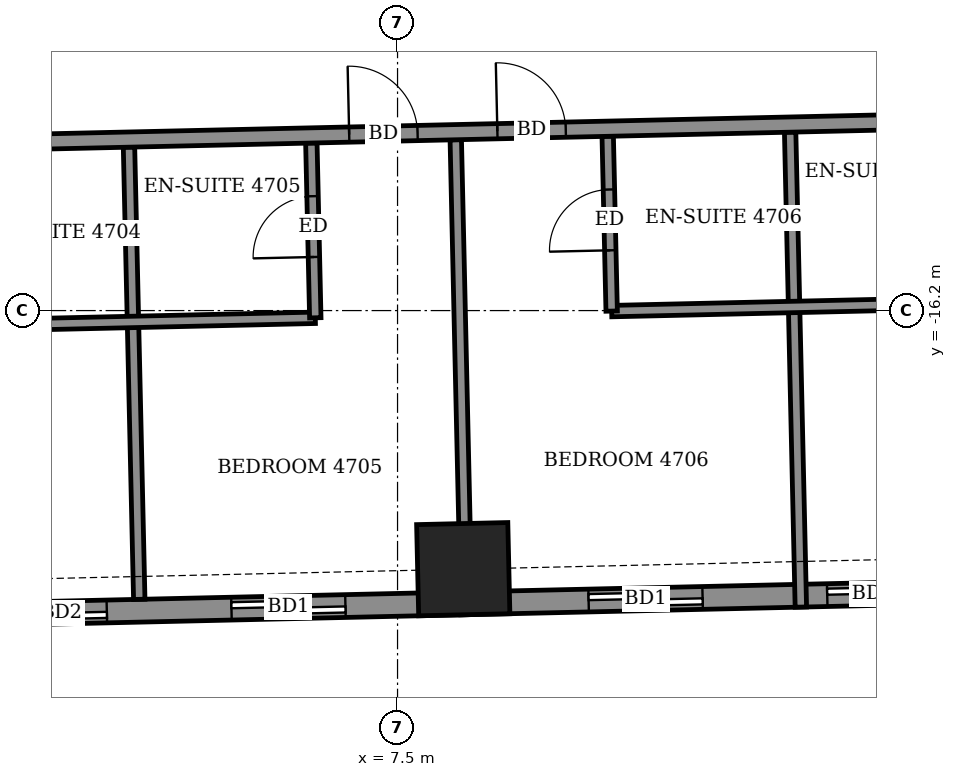
"""IFC4 building model, lengths in metres.
Left out: names, types, materials, properties, quantities, classifications, styles, units other than length and angle.
Written with IfcOpenShell. Run it as: python <this file> out.ifc"""

import sys

from ifc_helpers import new_model, si_unit, direction, frame, frame_2d, origin, origin_2d, place, context, subcontext, project, spatial, rectangle, extrude, element, fill, save


model = new_model("IFC4")
c1 = context("Model", 3, precision=1e-05, world=origin(), true_north=direction((0.0, 1.0)))
c2 = subcontext(c1, "Body", "Model", "MODEL_VIEW")
j1 = project(units=[si_unit("LENGTHUNIT", "METRE"), si_unit("PLANEANGLEUNIT", "RADIAN")], contexts=[c1])
p1 = place(None, origin())
s1 = spatial("IfcSite", under=j1, at=p1, CompositionType="ELEMENT")
p2 = place(p1, origin())
s2 = spatial("IfcBuilding", under=s1, at=p2, CompositionType="ELEMENT")
p3 = place(p2, frame((0.0, 0.0, 186.1)))
s3 = spatial("IfcBuildingStorey", under=s2, at=p3, CompositionType="ELEMENT", Elevation=186.1)
p4 = place(p3, frame((8.365, -19.602, -0.55), z_axis=(0.0, 0.0, 1.0), x_axis=(0.99974280054, 0.022678905801, 0.0)))
e1 = element("IfcColumn", 1, at=p4, inside=s3, PredefinedType="COLUMN", context=c2, shape_type="SweptSolid", body=[
    extrude(rectangle(XDim=1.2, YDim=1.2, at=origin_2d()), origin(), (0.0, 0.0, 1.0), 3.6),
])
p5 = place(p3, frame((-18.189, -20.655, 0.0), z_axis=(0.0, 0.0, 1.0), x_axis=(0.999742285265, 0.022701609063, 0.0)))
e2 = element("IfcWall", 2, at=p5, inside=s3, PredefinedType="SOLIDWALL", context=c2, shape_type="SweptSolid", body=[
    extrude(rectangle(XDim=39.78, YDim=0.3, at=frame_2d((19.89, 0.0))), origin(), (0.0, 0.0, 1.0), 3.05),
])
p6 = place(p5, frame((1.948, 0.0, 0.0)))
e3 = element("IfcOpeningElement", 3, at=p6, cuts=e2, PredefinedType="OPENING", context=c2, shape_type="SweptSolid", body=[
    extrude(rectangle(XDim=1.5, YDim=2.4, at=frame_2d((0.75, 1.2))), frame((0.0, 0.16, 0.0), z_axis=(0.0, -1.0, 0.0), x_axis=(1.0, 0.0, 0.0)), (0.0, 0.0, 1.0), 0.32),
])
p7 = place(p5, frame((7.24, 0.0, 0.0)))
e4 = element("IfcOpeningElement", 4, at=p7, cuts=e2, PredefinedType="OPENING", context=c2, shape_type="SweptSolid", body=[
    extrude(rectangle(XDim=1.5, YDim=2.4, at=frame_2d((0.75, 1.2))), frame((0.0, 0.16, 0.0), z_axis=(0.0, -1.0, 0.0), x_axis=(1.0, 0.0, 0.0)), (0.0, 0.0, 1.0), 0.32),
])
p8 = place(p5, frame((10.23, 0.0, 0.0)))
e5 = element("IfcOpeningElement", 5, at=p8, cuts=e2, PredefinedType="OPENING", context=c2, shape_type="SweptSolid", body=[
    extrude(rectangle(XDim=1.5, YDim=2.4, at=frame_2d((0.75, 1.2))), frame((0.0, 0.16, 0.0), z_axis=(0.0, -1.0, 0.0), x_axis=(1.0, 0.0, 0.0)), (0.0, 0.0, 1.0), 0.32),
])
p9 = place(p5, frame((14.955, 0.0, 0.0)))
e6 = element("IfcOpeningElement", 6, at=p9, cuts=e2, PredefinedType="OPENING", context=c2, shape_type="SweptSolid", body=[
    extrude(rectangle(XDim=1.5, YDim=2.4, at=frame_2d((0.75, 1.2))), frame((0.0, 0.16, 0.0), z_axis=(0.0, -1.0, 0.0), x_axis=(1.0, 0.0, 0.0)), (0.0, 0.0, 1.0), 0.32),
])
p10 = place(p5, frame((20.67, 0.0, 0.0)))
e7 = element("IfcOpeningElement", 7, at=p10, cuts=e2, PredefinedType="OPENING", context=c2, shape_type="SweptSolid", body=[
    extrude(rectangle(XDim=1.2, YDim=2.4, at=frame_2d((0.6, 1.2))), frame((0.0, 0.16, 0.0), z_axis=(0.0, -1.0, 0.0), x_axis=(1.0, 0.0, 0.0)), (0.0, 0.0, 1.0), 0.32),
])
p11 = place(p5, frame((23.51, 0.0, 0.0)))
e8 = element("IfcOpeningElement", 8, at=p11, cuts=e2, PredefinedType="OPENING", context=c2, shape_type="SweptSolid", body=[
    extrude(rectangle(XDim=1.5, YDim=2.4, at=frame_2d((0.75, 1.2))), frame((0.0, 0.16, 0.0), z_axis=(0.0, -1.0, 0.0), x_axis=(1.0, 0.0, 0.0)), (0.0, 0.0, 1.0), 0.32),
])
p12 = place(p5, frame((28.21, 0.0, 0.0)))
e9 = element("IfcOpeningElement", 9, at=p12, cuts=e2, PredefinedType="OPENING", context=c2, shape_type="SweptSolid", body=[
    extrude(rectangle(XDim=1.5, YDim=2.4, at=frame_2d((0.75, 1.2))), frame((0.0, 0.16, 0.0), z_axis=(0.0, -1.0, 0.0), x_axis=(1.0, 0.0, 0.0)), (0.0, 0.0, 1.0), 0.32),
])
p13 = place(p5, frame((31.35, 0.0, 0.0)))
e10 = element("IfcOpeningElement", 10, at=p13, cuts=e2, PredefinedType="OPENING", context=c2, shape_type="SweptSolid", body=[
    extrude(rectangle(XDim=1.2, YDim=2.4, at=frame_2d((0.6, 1.2))), frame((0.0, 0.16, 0.0), z_axis=(0.0, -1.0, 0.0), x_axis=(1.0, 0.0, 0.0)), (0.0, 0.0, 1.0), 0.32),
])
p14 = place(p5, frame((35.94, 0.0, 0.9)))
e11 = element("IfcOpeningElement", 11, at=p14, cuts=e2, PredefinedType="OPENING", context=c2, shape_type="SweptSolid", body=[
    extrude(rectangle(XDim=2.4, YDim=1.5, at=frame_2d((1.2, 0.75))), frame((0.0, 0.16, 0.0), z_axis=(0.0, -1.0, 0.0), x_axis=(1.0, 0.0, 0.0)), (0.0, 0.0, 1.0), 0.32),
])
p15 = place(p3, frame((4.102, -19.999, 0.0), z_axis=(0.0, 0.0, 1.0), x_axis=(-0.022688785847, 0.999742576365, 0.0)))
e12 = element("IfcWall", 12, at=p15, inside=s3, PredefinedType="PARTITIONING", context=c2, shape_type="SweptSolid", body=[
    extrude(rectangle(XDim=5.95, YDim=0.15, at=frame_2d((2.975, 0.0))), origin(), (0.0, 0.0, 1.0), 2.55),
])
p16 = place(p3, frame((8.407, -20.201, 0.0), z_axis=(0.0, 0.0, 1.0), x_axis=(-0.022540379945, 0.999745933361, 0.0)))
e13 = element("IfcWall", 13, at=p16, inside=s3, PredefinedType="PARTITIONING", context=c2, shape_type="SweptSolid", body=[
    extrude(rectangle(XDim=6.25, YDim=0.15, at=frame_2d((3.125, 0.0))), origin(), (0.0, 0.0, 1.0), 3.05),
])
p17 = place(p3, frame((12.806, -20.101, 0.0), z_axis=(0.0, 0.0, 1.0), x_axis=(-0.022540379945, 0.999745933361, 0.0)))
e14 = element("IfcWall", 14, at=p17, inside=s3, PredefinedType="PARTITIONING", context=c2, shape_type="SweptSolid", body=[
    extrude(rectangle(XDim=6.25, YDim=0.15, at=frame_2d((3.125, 0.0))), origin(), (0.0, 0.0, 1.0), 2.55),
])
p18 = place(p3, frame((1.62, -16.404, 0.0), z_axis=(0.0, 0.0, 1.0), x_axis=(0.999741415159, 0.022739894798, 0.0)))
e15 = element("IfcWall", 15, at=p18, inside=s3, PredefinedType="PARTITIONING", context=c2, shape_type="SweptSolid", body=[
    extrude(rectangle(XDim=4.799, YDim=0.15, at=frame_2d((2.399, 0.0))), origin(), (0.0, 0.0, 1.0), 3.05),
])
p19 = place(p3, frame((6.418, -16.295, 0.0), z_axis=(0.0, 0.0, 1.0), x_axis=(-0.022615284993, 0.999744241736, 0.0)))
e16 = element("IfcWall", 16, at=p19, inside=s3, PredefinedType="PARTITIONING", context=c2, shape_type="SweptSolid", body=[
    extrude(rectangle(XDim=2.299, YDim=0.15, at=frame_2d((1.15, 0.0))), origin(), (0.0, 0.0, 1.0), 3.05),
])
p20 = place(p19, frame((0.8, 0.0, 0.0)))
e17 = element("IfcOpeningElement", 17, at=p20, cuts=e16, PredefinedType="OPENING", context=c2, shape_type="SweptSolid", body=[
    extrude(rectangle(XDim=0.8, YDim=2.1, at=frame_2d((0.4, 1.05))), frame((0.0, 0.085, 0.0), z_axis=(0.0, -1.0, 0.0), x_axis=(1.0, 0.0, 0.0)), (0.0, 0.0, 1.0), 0.17),
])
p21 = place(p3, frame((10.317, -16.207, 0.0), z_axis=(0.0, 0.0, 1.0), x_axis=(0.99974154664, 0.022734113616, 0.0)))
e18 = element("IfcWall", 18, at=p21, inside=s3, PredefinedType="PARTITIONING", context=c2, shape_type="SweptSolid", body=[
    extrude(rectangle(XDim=4.8, YDim=0.15, at=frame_2d((2.4, 0.0))), origin(), (0.0, 0.0, 1.0), 3.05),
])
p22 = place(p3, frame((10.317, -16.207, 0.0), z_axis=(0.0, 0.0, 1.0), x_axis=(-0.022603288534, 0.999744513037, 0.0)))
e19 = element("IfcWall", 19, at=p22, inside=s3, PredefinedType="PARTITIONING", context=c2, shape_type="SweptSolid", body=[
    extrude(rectangle(XDim=2.301, YDim=0.15, at=frame_2d((1.15, 0.0))), origin(), (0.0, 0.0, 1.0), 3.05),
])
p23 = place(p22, frame((0.8, 0.0, 0.0)))
e20 = element("IfcOpeningElement", 20, at=p23, cuts=e19, PredefinedType="OPENING", context=c2, shape_type="SweptSolid", body=[
    extrude(rectangle(XDim=0.8, YDim=2.1, at=frame_2d((0.4, 1.05))), frame((0.0, 0.085, 0.0), z_axis=(0.0, -1.0, 0.0), x_axis=(1.0, 0.0, 0.0)), (0.0, 0.0, 1.0), 0.17),
])
p24 = place(p3, frame((-21.279, -14.523, 0.0), z_axis=(0.0, 0.0, 1.0), x_axis=(0.999742878501, 0.022675468818, 0.0)))
e21 = element("IfcWall", 21, at=p24, inside=s3, PredefinedType="PARTITIONING", context=c2, shape_type="SweptSolid", body=[
    extrude(rectangle(XDim=46.48, YDim=0.2, at=frame_2d((23.24, 0.0))), origin(), (0.0, 0.0, 1.0), 3.05),
])
p25 = place(p24, frame((1.4, 0.0, 0.0)))
e22 = element("IfcOpeningElement", 22, at=p25, cuts=e21, PredefinedType="OPENING", context=c2, shape_type="SweptSolid", body=[
    extrude(rectangle(XDim=1.0, YDim=2.1, at=frame_2d((0.5, 1.05))), frame((0.0, 0.11, 0.0), z_axis=(0.0, -1.0, 0.0), x_axis=(1.0, 0.0, 0.0)), (0.0, 0.0, 1.0), 0.22),
])
p26 = place(p24, frame((5.95, 0.0, 0.0)))
e23 = element("IfcOpeningElement", 23, at=p26, cuts=e21, PredefinedType="OPENING", context=c2, shape_type="SweptSolid", body=[
    extrude(rectangle(XDim=0.9, YDim=2.1, at=frame_2d((0.45, 1.05))), frame((0.0, 0.11, 0.0), z_axis=(0.0, -1.0, 0.0), x_axis=(1.0, 0.0, 0.0)), (0.0, 0.0, 1.0), 0.22),
])
p27 = place(p24, frame((10.575, 0.0, 0.0)))
e24 = element("IfcOpeningElement", 24, at=p27, cuts=e21, PredefinedType="OPENING", context=c2, shape_type="SweptSolid", body=[
    extrude(rectangle(XDim=0.9, YDim=2.1, at=frame_2d((0.45, 1.05))), frame((0.0, 0.11, 0.0), z_axis=(0.0, -1.0, 0.0), x_axis=(1.0, 0.0, 0.0)), (0.0, 0.0, 1.0), 0.22),
])
p28 = place(p24, frame((12.625, 0.0, 0.0)))
e25 = element("IfcOpeningElement", 25, at=p28, cuts=e21, PredefinedType="OPENING", context=c2, shape_type="SweptSolid", body=[
    extrude(rectangle(XDim=0.9, YDim=2.1, at=frame_2d((0.45, 1.05))), frame((0.0, 0.11, 0.0), z_axis=(0.0, -1.0, 0.0), x_axis=(1.0, 0.0, 0.0)), (0.0, 0.0, 1.0), 0.22),
])
p29 = place(p24, frame((19.4, 0.0, 0.0)))
e26 = element("IfcOpeningElement", 26, at=p29, cuts=e21, PredefinedType="OPENING", context=c2, shape_type="SweptSolid", body=[
    extrude(rectangle(XDim=0.9, YDim=2.1, at=frame_2d((0.45, 1.05))), frame((0.0, 0.11, 0.0), z_axis=(0.0, -1.0, 0.0), x_axis=(1.0, 0.0, 0.0)), (0.0, 0.0, 1.0), 0.22),
])
p30 = place(p24, frame((21.375, 0.0, 0.0)))
e27 = element("IfcOpeningElement", 27, at=p30, cuts=e21, PredefinedType="OPENING", context=c2, shape_type="SweptSolid", body=[
    extrude(rectangle(XDim=0.9, YDim=2.1, at=frame_2d((0.45, 1.05))), frame((0.0, 0.11, 0.0), z_axis=(0.0, -1.0, 0.0), x_axis=(1.0, 0.0, 0.0)), (0.0, 0.0, 1.0), 0.22),
])
p31 = place(p24, frame((28.15, 0.0, 0.0)))
e28 = element("IfcOpeningElement", 28, at=p31, cuts=e21, PredefinedType="OPENING", context=c2, shape_type="SweptSolid", body=[
    extrude(rectangle(XDim=0.9, YDim=2.1, at=frame_2d((0.45, 1.05))), frame((0.0, 0.11, 0.0), z_axis=(0.0, -1.0, 0.0), x_axis=(1.0, 0.0, 0.0)), (0.0, 0.0, 1.0), 0.22),
])
p32 = place(p24, frame((30.1, 0.0, 0.0)))
e29 = element("IfcOpeningElement", 29, at=p32, cuts=e21, PredefinedType="OPENING", context=c2, shape_type="SweptSolid", body=[
    extrude(rectangle(XDim=0.9, YDim=2.1, at=frame_2d((0.45, 1.05))), frame((0.0, 0.11, 0.0), z_axis=(0.0, -1.0, 0.0), x_axis=(1.0, 0.0, 0.0)), (0.0, 0.0, 1.0), 0.22),
])
p33 = place(p24, frame((36.875, 0.0, 0.0)))
e30 = element("IfcOpeningElement", 30, at=p33, cuts=e21, PredefinedType="OPENING", context=c2, shape_type="SweptSolid", body=[
    extrude(rectangle(XDim=0.9, YDim=2.1, at=frame_2d((0.45, 1.05))), frame((0.0, 0.11, 0.0), z_axis=(0.0, -1.0, 0.0), x_axis=(1.0, 0.0, 0.0)), (0.0, 0.0, 1.0), 0.22),
])
p34 = place(p24, frame((43.89, 0.0, 0.0)))
e31 = element("IfcOpeningElement", 31, at=p34, cuts=e21, PredefinedType="OPENING", context=c2, shape_type="SweptSolid", body=[
    extrude(rectangle(XDim=1.0, YDim=2.1, at=frame_2d((0.5, 1.05))), frame((0.0, 0.11, 0.0), z_axis=(0.0, -1.0, 0.0), x_axis=(1.0, 0.0, 0.0)), (0.0, 0.0, 1.0), 0.22),
])
p35 = place(p24, frame((39.05, 0.0, 0.0)))
e32 = element("IfcOpeningElement", 32, at=p35, cuts=e21, PredefinedType="OPENING", context=c2, shape_type="SweptSolid", body=[
    extrude(rectangle(XDim=0.9, YDim=2.1, at=frame_2d((0.45, 1.05))), frame((0.0, 0.11, 0.0), z_axis=(0.0, -1.0, 0.0), x_axis=(1.0, 0.0, 0.0)), (0.0, 0.0, 1.0), 0.22),
])
p36 = place(p10, origin())
e33 = element("IfcDoor", 33, at=p36, inside=s3, OperationType="SLIDING_TO_LEFT", PredefinedType="DOOR", context=c2, shape_type="SweptSolid", body=[
    extrude(rectangle(XDim=1.2, YDim=2.4, at=frame_2d((0.6, 1.2))), frame((0.0, 0.025, 0.0), z_axis=(0.0, -1.0, 0.0), x_axis=(1.0, 0.0, 0.0)), (0.0, 0.0, 1.0), 0.05),
])
fill(e7, e33)
p37 = place(p11, origin())
e34 = element("IfcDoor", 34, at=p37, inside=s3, OperationType="SLIDING_TO_LEFT", PredefinedType="DOOR", context=c2, shape_type="SweptSolid", body=[
    extrude(rectangle(XDim=1.5, YDim=2.4, at=frame_2d((0.75, 1.2))), frame((0.0, 0.025, 0.0), z_axis=(0.0, -1.0, 0.0), x_axis=(1.0, 0.0, 0.0)), (0.0, 0.0, 1.0), 0.05),
])
fill(e8, e34)
p38 = place(p12, origin())
e35 = element("IfcDoor", 35, at=p38, inside=s3, OperationType="SLIDING_TO_LEFT", PredefinedType="DOOR", context=c2, shape_type="SweptSolid", body=[
    extrude(rectangle(XDim=1.5, YDim=2.4, at=frame_2d((0.75, 1.2))), frame((0.0, 0.025, 0.0), z_axis=(0.0, -1.0, 0.0), x_axis=(1.0, 0.0, 0.0)), (0.0, 0.0, 1.0), 0.05),
])
fill(e9, e35)
p39 = place(p13, origin())
e36 = element("IfcDoor", 36, at=p39, inside=s3, OperationType="SLIDING_TO_LEFT", PredefinedType="DOOR", context=c2, shape_type="SweptSolid", body=[
    extrude(rectangle(XDim=1.2, YDim=2.4, at=frame_2d((0.6, 1.2))), frame((0.0, 0.025, 0.0), z_axis=(0.0, -1.0, 0.0), x_axis=(1.0, 0.0, 0.0)), (0.0, 0.0, 1.0), 0.05),
])
fill(e10, e36)
p40 = place(p31, origin())
e37 = element("IfcDoor", 37, at=p40, inside=s3, OperationType="SINGLE_SWING_LEFT", PredefinedType="DOOR", context=c2, shape_type="SweptSolid", body=[
    extrude(rectangle(XDim=0.9, YDim=2.1, at=frame_2d((0.45, 1.05))), frame((0.0, 0.025, 0.0), z_axis=(0.0, -1.0, 0.0), x_axis=(1.0, 0.0, 0.0)), (0.0, 0.0, 1.0), 0.05),
])
fill(e28, e37)
p41 = place(p20, origin())
e38 = element("IfcDoor", 38, at=p41, inside=s3, OperationType="SINGLE_SWING_LEFT", PredefinedType="DOOR", context=c2, shape_type="SweptSolid", body=[
    extrude(rectangle(XDim=0.8, YDim=2.1, at=frame_2d((0.4, 1.05))), frame((0.0, 0.025, 0.0), z_axis=(0.0, -1.0, 0.0), x_axis=(1.0, 0.0, 0.0)), (0.0, 0.0, 1.0), 0.05),
])
fill(e17, e38)
p42 = place(p32, origin())
e39 = element("IfcDoor", 39, at=p42, inside=s3, OperationType="SINGLE_SWING_RIGHT", PredefinedType="DOOR", context=c2, shape_type="SweptSolid", body=[
    extrude(rectangle(XDim=0.9, YDim=2.1, at=frame_2d((0.45, 1.05))), frame((0.0, 0.025, 0.0), z_axis=(0.0, -1.0, 0.0), x_axis=(1.0, 0.0, 0.0)), (0.0, 0.0, 1.0), 0.05),
])
fill(e29, e39)
p43 = place(p23, origin())
e40 = element("IfcDoor", 40, at=p43, inside=s3, OperationType="SINGLE_SWING_RIGHT", PredefinedType="DOOR", context=c2, shape_type="SweptSolid", body=[
    extrude(rectangle(XDim=0.8, YDim=2.1, at=frame_2d((0.4, 1.05))), frame((0.0, 0.025, 0.0), z_axis=(0.0, -1.0, 0.0), x_axis=(1.0, 0.0, 0.0)), (0.0, 0.0, 1.0), 0.05),
])
fill(e20, e40)
save(model, sys.argv[1])
